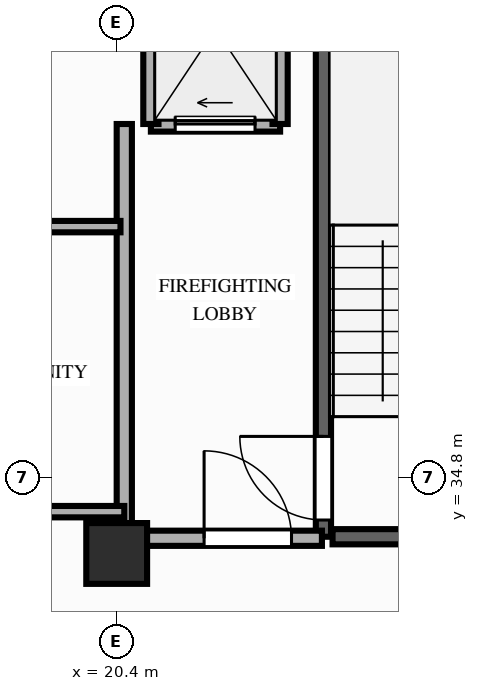
"""IFC4 building model, lengths in metres.
Left out: names, types, materials, properties, quantities, classifications, styles, units other than length and angle.
Written with IfcOpenShell. Run it as: python <this file> out.ifc"""

import sys

from ifc_helpers import new_model, si_unit, direction, frame, frame_2d, origin, origin_2d, place, context, subcontext, project, spatial, rectangle, extrude, element, fill, save


model = new_model("IFC4")
c1 = context("Model", 3, precision=1e-05, world=origin(), true_north=direction((0.0, 1.0)))
c2 = subcontext(c1, "Body", "Model", "MODEL_VIEW")
j1 = project(units=[si_unit("LENGTHUNIT", "METRE"), si_unit("PLANEANGLEUNIT", "RADIAN")], contexts=[c1])
p1 = place(None, origin())
s1 = spatial("IfcSite", under=j1, at=p1, CompositionType="ELEMENT")
p2 = place(p1, origin())
s2 = spatial("IfcBuilding", under=s1, at=p2, CompositionType="ELEMENT")
p3 = place(p2, frame((0.0, 0.0, 198.4)))
s3 = spatial("IfcBuildingStorey", under=s2, at=p3, CompositionType="ELEMENT", Elevation=198.4)
p4 = place(p3, frame((20.4, 33.8, 0.0), z_axis=(0.0, 0.0, 1.0), x_axis=(1.0, 0.0, 0.0)))
e1 = element("IfcColumn", 1, at=p4, inside=s3, PredefinedType="COLUMN", context=c2, shape_type="SweptSolid", body=[
    extrude(rectangle(XDim=0.8, YDim=0.8, at=origin_2d()), origin(), (0.0, 0.0, 1.0), 3.2),
])
p5 = place(p3, frame((23.12, 34.02, 0.0), z_axis=(0.0, 0.0, 1.0), x_axis=(0.0, 1.0, 0.0)))
e2 = element("IfcWall", 2, at=p5, inside=s3, PredefinedType="SHEAR", context=c2, shape_type="SweptSolid", body=[
    extrude(rectangle(XDim=7.78, YDim=0.2, at=frame_2d((3.89, 0.0))), origin(), (0.0, 0.0, 1.0), 3.02),
])
p6 = place(p5, frame((0.22, 0.0, 0.0)))
e3 = element("IfcOpeningElement", 3, at=p6, cuts=e2, PredefinedType="OPENING", context=c2, shape_type="SweptSolid", body=[
    extrude(rectangle(XDim=1.1, YDim=2.15, at=frame_2d((0.55, 1.075))), frame((0.0, 0.11, 0.0), z_axis=(0.0, -1.0, 0.0), x_axis=(1.0, 0.0, 0.0)), (0.0, 0.0, 1.0), 0.22),
])
p7 = place(p3, frame((23.24, 34.02, 0.0), z_axis=(0.0, 0.0, 1.0), x_axis=(1.0, 0.0, 0.0)))
e4 = element("IfcWall", 4, at=p7, inside=s3, PredefinedType="SHEAR", context=c2, shape_type="SweptSolid", body=[
    extrude(rectangle(XDim=2.88, YDim=0.2, at=frame_2d((1.44, 0.0))), origin(), (0.0, 0.0, 1.0), 3.02),
])
p8 = place(p3, frame((20.85, 39.45, 0.0), z_axis=(0.0, 0.0, 1.0), x_axis=(1.0, 0.0, 0.0)))
e5 = element("IfcWall", 5, at=p8, inside=s3, PredefinedType="MOVABLE", context=c2, shape_type="SweptSolid", body=[
    extrude(rectangle(XDim=1.7, YDim=0.2, at=frame_2d((0.85, 0.0))), origin(), (0.0, 0.0, 1.0), 3.02),
])
p9 = place(p8, frame((0.32, 0.0, 0.0)))
e6 = element("IfcOpeningElement", 6, at=p9, cuts=e5, PredefinedType="OPENING", context=c2, shape_type="SweptSolid", body=[
    extrude(rectangle(XDim=1.05, YDim=2.15, at=frame_2d((0.525, 1.075))), frame((0.0, 0.11, 0.0), z_axis=(0.0, -1.0, 0.0), x_axis=(1.0, 0.0, 0.0)), (0.0, 0.0, 1.0), 0.22),
])
for number, where, z_axis, x_axis in (
    (7, (20.85, 39.45, 0.0), (0.0, 0.0, 1.0), (0.0, 1.0, 0.0)),
    (8, (22.55, 39.45, 0.0), (0.0, 0.0, 1.0), (0.0, 1.0, 0.0)),
):
    element("IfcWall", number, at=place(p3, frame(where, z_axis=z_axis, x_axis=x_axis)), inside=s3, PredefinedType="MOVABLE", context=c2, shape_type="SweptSolid", body=[
        extrude(rectangle(XDim=2.65, YDim=0.2, at=frame_2d((1.325, 0.0))), origin(), (0.0, 0.0, 1.0), 2.51),
    ])
p10 = place(p3, frame((20.5, 34.0, 0.0), z_axis=(0.0, 0.0, 1.0), x_axis=(0.0, 1.0, 0.0)))
e9 = element("IfcWall", 9, at=p10, inside=s3, PredefinedType="PARTITIONING", context=c2, shape_type="SweptSolid", body=[
    extrude(rectangle(XDim=5.45, YDim=0.2, at=frame_2d((2.725, 0.0))), origin(), (0.0, 0.0, 1.0), 2.51),
])
p11 = place(p3, frame((20.5, 34.0, 0.0), z_axis=(0.0, 0.0, 1.0), x_axis=(1.0, 0.0, 0.0)))
e10 = element("IfcWall", 10, at=p11, inside=s3, PredefinedType="PARTITIONING", context=c2, shape_type="SweptSolid", body=[
    extrude(rectangle(XDim=2.6, YDim=0.2, at=frame_2d((1.3, 0.0))), origin(), (0.0, 0.0, 1.0), 2.51),
])
p12 = place(p11, frame((1.05, 0.0, 0.0)))
e11 = element("IfcOpeningElement", 11, at=p12, cuts=e10, PredefinedType="OPENING", context=c2, shape_type="SweptSolid", body=[
    extrude(rectangle(XDim=1.15, YDim=2.15, at=frame_2d((0.575, 1.075))), frame((0.0, 0.11, 0.0), z_axis=(0.0, -1.0, 0.0), x_axis=(1.0, 0.0, 0.0)), (0.0, 0.0, 1.0), 0.22),
])
p13 = place(p3, frame((12.9, 34.35, 0.0), z_axis=(0.0, 0.0, 1.0), x_axis=(1.0, 0.0, 0.0)))
e12 = element("IfcWall", 12, at=p13, inside=s3, PredefinedType="PARTITIONING", context=c2, shape_type="SweptSolid", body=[
    extrude(rectangle(XDim=7.6, YDim=0.15, at=frame_2d((3.8, 0.0))), origin(), (0.0, 0.0, 1.0), 3.02),
])
p14 = place(p13, frame((1.4, 0.0, 0.0)))
e13 = element("IfcOpeningElement", 13, at=p14, cuts=e12, PredefinedType="OPENING", context=c2, shape_type="SweptSolid", body=[
    extrude(rectangle(XDim=0.95, YDim=2.15, at=frame_2d((0.475, 1.075))), frame((0.0, 0.085, 0.0), z_axis=(0.0, -1.0, 0.0), x_axis=(1.0, 0.0, 0.0)), (0.0, 0.0, 1.0), 0.17),
])
p15 = place(p13, frame((4.6, 0.0, 0.0)))
e14 = element("IfcOpeningElement", 14, at=p15, cuts=e12, PredefinedType="OPENING", context=c2, shape_type="SweptSolid", body=[
    extrude(rectangle(XDim=0.95, YDim=2.15, at=frame_2d((0.475, 1.075))), frame((0.0, 0.085, 0.0), z_axis=(0.0, -1.0, 0.0), x_axis=(1.0, 0.0, 0.0)), (0.0, 0.0, 1.0), 0.17),
])
p16 = place(p3, frame((16.7, 38.1, 0.0), z_axis=(0.0, 0.0, 1.0), x_axis=(1.0, 0.0, 0.0)))
e15 = element("IfcWall", 15, at=p16, inside=s3, PredefinedType="PARTITIONING", context=c2, shape_type="SweptSolid", body=[
    extrude(rectangle(XDim=3.75, YDim=0.15, at=frame_2d((1.875, 0.0))), origin(), (0.0, 0.0, 1.0), 3.02),
])
p17 = place(p16, frame((1.45, 0.0, 0.0)))
e16 = element("IfcOpeningElement", 16, at=p17, cuts=e15, PredefinedType="OPENING", context=c2, shape_type="SweptSolid", body=[
    extrude(rectangle(XDim=0.85, YDim=2.05, at=frame_2d((0.425, 1.025))), frame((0.0, 0.085, 0.0), z_axis=(0.0, -1.0, 0.0), x_axis=(1.0, 0.0, 0.0)), (0.0, 0.0, 1.0), 0.17),
])
p18 = place(p6, origin())
e17 = element("IfcDoor", 17, at=p18, inside=s3, OperationType="SINGLE_SWING_RIGHT", PredefinedType="DOOR", context=c2, shape_type="SweptSolid", body=[
    extrude(rectangle(XDim=1.1, YDim=2.15, at=frame_2d((0.55, 1.075))), frame((0.0, 0.025, 0.0), z_axis=(0.0, -1.0, 0.0), x_axis=(1.0, 0.0, 0.0)), (0.0, 0.0, 1.0), 0.05),
])
fill(e3, e17)
p19 = place(p9, origin())
e18 = element("IfcDoor", 18, at=p19, inside=s3, OperationType="SLIDING_TO_LEFT", PredefinedType="DOOR", context=c2, shape_type="SweptSolid", body=[
    extrude(rectangle(XDim=1.05, YDim=2.15, at=frame_2d((0.525, 1.075))), frame((0.0, 0.025, 0.0), z_axis=(0.0, -1.0, 0.0), x_axis=(1.0, 0.0, 0.0)), (0.0, 0.0, 1.0), 0.05),
])
fill(e6, e18)
p20 = place(p12, origin())
e19 = element("IfcDoor", 19, at=p20, inside=s3, OperationType="SINGLE_SWING_LEFT", PredefinedType="DOOR", context=c2, shape_type="SweptSolid", body=[
    extrude(rectangle(XDim=1.15, YDim=2.15, at=frame_2d((0.575, 1.075))), frame((0.0, 0.025, 0.0), z_axis=(0.0, -1.0, 0.0), x_axis=(1.0, 0.0, 0.0)), (0.0, 0.0, 1.0), 0.05),
])
fill(e11, e19)
save(model, sys.argv[1])
